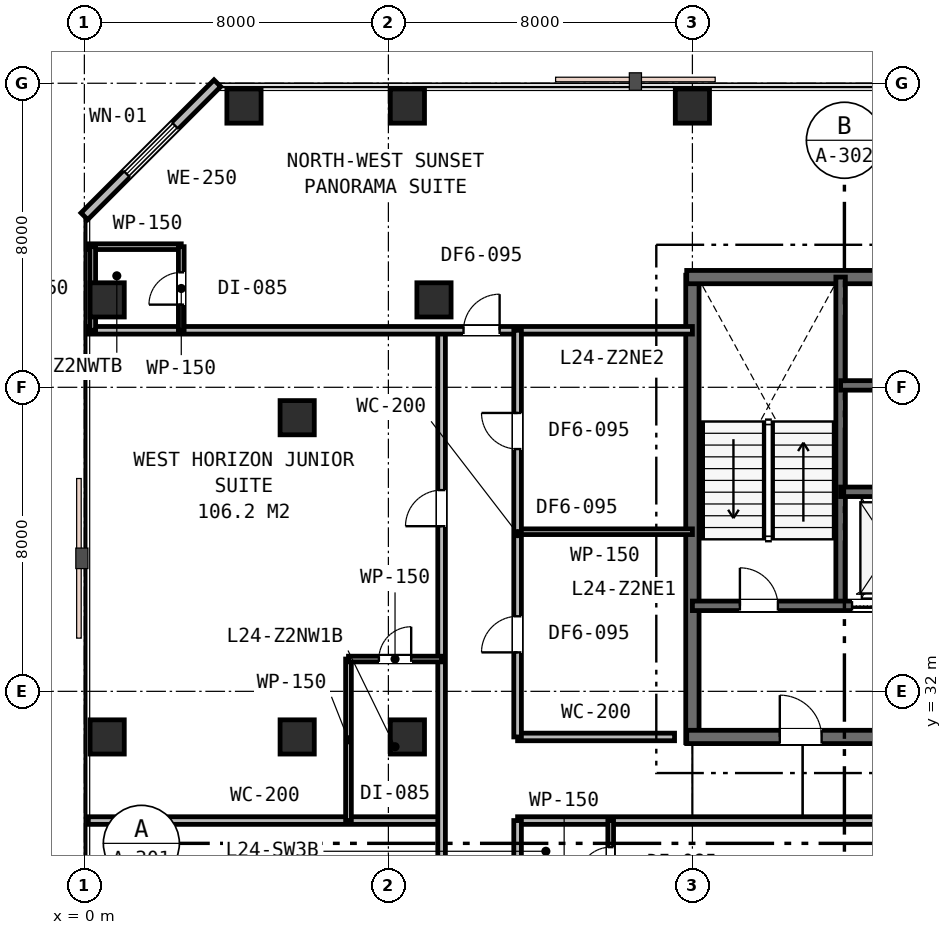
"""IFC4 building model, lengths in metres.
Left out: names, types, materials, properties, quantities, classifications, styles, units other than length and angle.
Written with IfcOpenShell. Run it as: python <this file> out.ifc"""

import sys

from ifc_helpers import new_model, si_unit, direction, frame, frame_2d, origin, origin_2d, place, context, subcontext, project, spatial, rectangle, extrude, element, fill, save


model = new_model("IFC4")
c1 = context("Model", 3, precision=1e-05, world=origin(), true_north=direction((0.0, 1.0)))
c2 = subcontext(c1, "Body", "Model", "MODEL_VIEW")
j1 = project(units=[si_unit("LENGTHUNIT", "METRE"), si_unit("PLANEANGLEUNIT", "RADIAN")], contexts=[c1])
p1 = place(None, origin())
s1 = spatial("IfcSite", under=j1, at=p1, CompositionType="ELEMENT")
p2 = place(p1, origin())
s2 = spatial("IfcBuilding", under=s1, at=p2, CompositionType="ELEMENT")
p3 = place(p2, frame((0.0, 0.0, 97.2)))
s3 = spatial("IfcBuildingStorey", under=s2, at=p3, CompositionType="ELEMENT", Elevation=97.2)
p4 = place(p3, frame((16.0, 30.65, 0.0), z_axis=(0.0, 0.0, 1.0), x_axis=(0.0, 1.0, 0.0)))
e1 = element("IfcWall", 1, at=p4, inside=s3, PredefinedType="SHEAR", context=c2, shape_type="SweptSolid", body=[
    extrude(rectangle(XDim=12.3, YDim=0.35, at=frame_2d((6.15, 0.0))), origin(), (0.0, 0.0, 1.0), 3.6),
])
p5 = place(p3, frame((15.85, 42.9, 0.0), z_axis=(0.0, 0.0, 1.0), x_axis=(1.0, 0.0, 0.0)))
e2 = element("IfcWall", 2, at=p5, inside=s3, PredefinedType="SHEAR", context=c2, shape_type="SweptSolid", body=[
    extrude(rectangle(XDim=24.3, YDim=0.35, at=frame_2d((12.15, 0.0))), origin(), (0.0, 0.0, 1.0), 3.6),
])
p6 = place(p3, frame((15.85, 30.8, 0.0), z_axis=(0.0, 0.0, 1.0), x_axis=(1.0, 0.0, 0.0)))
e3 = element("IfcWall", 3, at=p6, inside=s3, PredefinedType="SHEAR", context=c2, shape_type="SweptSolid", body=[
    extrude(rectangle(XDim=11.2, YDim=0.35, at=frame_2d((5.6, 0.0))), origin(), (0.0, 0.0, 1.0), 3.6),
])
p7 = place(p6, frame((2.45, 0.0, 0.0)))
e4 = element("IfcOpeningElement", 4, at=p7, cuts=e3, PredefinedType="OPENING", context=c2, shape_type="SweptSolid", body=[
    extrude(rectangle(XDim=1.1, YDim=2.15, at=frame_2d((0.55, 1.075))), frame((0.0, 0.185, 0.0), z_axis=(0.0, -1.0, 0.0), x_axis=(1.0, 0.0, 0.0)), (0.0, 0.0, 1.0), 0.37),
])
p8 = place(p3, frame((19.9, 34.25, 0.0), z_axis=(0.0, 0.0, 1.0), x_axis=(0.0, 1.0, 0.0)))
e5 = element("IfcWall", 5, at=p8, inside=s3, PredefinedType="SHEAR", context=c2, shape_type="SweptSolid", body=[
    extrude(rectangle(XDim=8.65, YDim=0.25, at=frame_2d((4.325, 0.0))), origin(), (0.0, 0.0, 1.0), 3.6),
])
p9 = place(p3, frame((16.0, 34.25, 0.0), z_axis=(0.0, 0.0, 1.0), x_axis=(1.0, 0.0, 0.0)))
e6 = element("IfcWall", 6, at=p9, inside=s3, PredefinedType="SHEAR", context=c2, shape_type="SweptSolid", body=[
    extrude(rectangle(XDim=6.05, YDim=0.25, at=frame_2d((3.025, 0.0))), origin(), (0.0, 0.0, 1.0), 3.6),
])
p10 = place(p9, frame((1.25, 0.0, 0.0)))
e7 = element("IfcOpeningElement", 7, at=p10, cuts=e6, PredefinedType="OPENING", context=c2, shape_type="SweptSolid", body=[
    extrude(rectangle(XDim=1.0, YDim=2.15, at=frame_2d((0.5, 1.075))), frame((0.0, 0.135, 0.0), z_axis=(0.0, -1.0, 0.0), x_axis=(1.0, 0.0, 0.0)), (0.0, 0.0, 1.0), 0.27),
])
p11 = place(p9, frame((4.2, 0.0, 0.0)))
e8 = element("IfcOpeningElement", 8, at=p11, cuts=e6, PredefinedType="OPENING", context=c2, shape_type="SweptSolid", body=[
    extrude(rectangle(XDim=1.1, YDim=2.15, at=frame_2d((0.55, 1.075))), frame((0.0, 0.135, 0.0), z_axis=(0.0, -1.0, 0.0), x_axis=(1.0, 0.0, 0.0)), (0.0, 0.0, 1.0), 0.27),
])
p12 = place(p3, frame((19.9, 37.25, 0.0), z_axis=(0.0, 0.0, 1.0), x_axis=(1.0, 0.0, 0.0)))
e9 = element("IfcWall", 9, at=p12, inside=s3, PredefinedType="SHEAR", context=c2, shape_type="SweptSolid", body=[
    extrude(rectangle(XDim=16.2, YDim=0.25, at=frame_2d((8.1, 0.0))), origin(), (0.0, 0.0, 1.0), 3.6),
])
p13 = place(p12, frame((12.55, 0.0, 0.0)))
e10 = element("IfcOpeningElement", 10, at=p13, cuts=e9, PredefinedType="OPENING", context=c2, shape_type="SweptSolid", body=[
    extrude(rectangle(XDim=0.9, YDim=2.15, at=frame_2d((0.45, 1.075))), frame((0.0, 0.135, 0.0), z_axis=(0.0, -1.0, 0.0), x_axis=(1.0, 0.0, 0.0)), (0.0, 0.0, 1.0), 0.27),
])
p14 = place(p3, frame((19.9, 40.05, 0.0), z_axis=(0.0, 0.0, 1.0), x_axis=(1.0, 0.0, 0.0)))
e11 = element("IfcWall", 11, at=p14, inside=s3, PredefinedType="SHEAR", context=c2, shape_type="SweptSolid", body=[
    extrude(rectangle(XDim=12.05, YDim=0.25, at=frame_2d((6.025, 0.0))), origin(), (0.0, 0.0, 1.0), 3.6),
])
for number, where, z_axis, x_axis in (
    (12, (5.6, 30.8, 0.0), (0.0, 0.0, 1.0), (1.0, 0.0, 0.0)),
    (13, (5.6, 39.2, 0.0), (0.0, 0.0, 1.0), (1.0, 0.0, 0.0)),
    (14, (8.5, 30.8, 0.0), (0.0, 0.0, 1.0), (1.0, 0.0, 0.0)),
    (15, (9.2, 42.3, 0.0), (0.0, 0.0, 1.0), (1.0, 0.0, 0.0)),
    (16, (0.6, 30.8, 0.0), (0.0, 0.0, 1.0), (1.0, 0.0, 0.0)),
    (17, (0.6, 42.3, 0.0), (0.0, 0.0, 1.0), (1.0, 0.0, 0.0)),
    (18, (4.2, 47.4, 0.0), (0.0, 0.0, 1.0), (1.0, 0.0, 0.0)),
    (19, (8.5, 47.4, 0.0), (0.0, 0.0, 1.0), (1.0, 0.0, 0.0)),
    (20, (16.0, 47.4, 0.0), (0.0, 0.0, 1.0), (1.0, 0.0, 0.0)),
):
    element("IfcColumn", number, at=place(p3, frame(where, z_axis=z_axis, x_axis=x_axis)), inside=s3, PredefinedType="COLUMN", context=c2, shape_type="SweptSolid", body=[
        extrude(rectangle(XDim=0.9, YDim=0.9, at=origin_2d()), origin(), (0.0, 0.0, 1.0), 3.6),
    ])
p15 = place(p3, frame((3.5, 48.0, 0.0), z_axis=(0.0, 0.0, 1.0), x_axis=(-0.707106781187, -0.707106781187, 0.0)))
e21 = element("IfcWall", 21, at=p15, inside=s3, PredefinedType="STANDARD", context=c2, shape_type="SweptSolid", body=[
    extrude(rectangle(XDim=4.95, YDim=0.25, at=frame_2d((2.475, 0.0))), origin(), (0.0, 0.0, 1.0), 3.33),
])
p16 = place(p15, frame((1.575, 0.0, 0.75)))
e22 = element("IfcOpeningElement", 22, at=p16, cuts=e21, PredefinedType="OPENING", context=c2, shape_type="SweptSolid", body=[
    extrude(rectangle(XDim=1.8, YDim=1.85, at=frame_2d((0.9, 0.925))), frame((0.0, 0.135, 0.0), z_axis=(0.0, -1.0, 0.0), x_axis=(1.0, 0.0, 0.0)), (0.0, 0.0, 1.0), 0.27),
])
p17 = place(p3, frame((0.1, 28.6, 0.0), z_axis=(0.0, 0.0, 1.0), x_axis=(1.0, 0.0, 0.0)))
e23 = element("IfcWall", 23, at=p17, inside=s3, PredefinedType="PARTITIONING", context=c2, shape_type="SweptSolid", body=[
    extrude(rectangle(XDim=9.3, YDim=0.2, at=frame_2d((4.65, 0.0))), origin(), (0.0, 0.0, 1.0), 2.83),
])
p18 = place(p3, frame((11.4, 28.6, 0.0), z_axis=(0.0, 0.0, 1.0), x_axis=(1.0, 0.0, 0.0)))
e24 = element("IfcWall", 24, at=p18, inside=s3, PredefinedType="PARTITIONING", context=c2, shape_type="SweptSolid", body=[
    extrude(rectangle(XDim=32.8, YDim=0.2, at=frame_2d((16.4, 0.0))), origin(), (0.0, 0.0, 1.0), 2.83),
])
p19 = place(p18, frame((14.7, 0.0, 0.0)))
e25 = element("IfcOpeningElement", 25, at=p19, cuts=e24, PredefinedType="OPENING", context=c2, shape_type="SweptSolid", body=[
    extrude(rectangle(XDim=0.95, YDim=2.15, at=frame_2d((0.475, 1.075))), frame((0.0, 0.11, 0.0), z_axis=(0.0, -1.0, 0.0), x_axis=(1.0, 0.0, 0.0)), (0.0, 0.0, 1.0), 0.22),
])
p20 = place(p18, frame((22.475, 0.0, 0.0)))
e26 = element("IfcOpeningElement", 26, at=p20, cuts=e24, PredefinedType="OPENING", context=c2, shape_type="SweptSolid", body=[
    extrude(rectangle(XDim=0.95, YDim=2.15, at=frame_2d((0.475, 1.075))), frame((0.0, 0.11, 0.0), z_axis=(0.0, -1.0, 0.0), x_axis=(1.0, 0.0, 0.0)), (0.0, 0.0, 1.0), 0.22),
])
p21 = place(p18, frame((28.985, 0.0, 0.0)))
e27 = element("IfcOpeningElement", 27, at=p21, cuts=e24, PredefinedType="OPENING", context=c2, shape_type="SweptSolid", body=[
    extrude(rectangle(XDim=0.95, YDim=2.15, at=frame_2d((0.475, 1.075))), frame((0.0, 0.11, 0.0), z_axis=(0.0, -1.0, 0.0), x_axis=(1.0, 0.0, 0.0)), (0.0, 0.0, 1.0), 0.22),
])
p22 = place(p3, frame((11.4, 30.8, 0.0), z_axis=(0.0, 0.0, 1.0), x_axis=(1.0, 0.0, 0.0)))
e28 = element("IfcWall", 28, at=p22, inside=s3, PredefinedType="PARTITIONING", context=c2, shape_type="SweptSolid", body=[
    extrude(rectangle(XDim=4.13, YDim=0.2, at=frame_2d((2.065, 0.0))), origin(), (0.0, 0.0, 1.0), 2.83),
])
p23 = place(p3, frame((9.4, 10.6, 0.0), z_axis=(0.0, 0.0, 1.0), x_axis=(0.0, 1.0, 0.0)))
e29 = element("IfcWall", 29, at=p23, inside=s3, PredefinedType="PARTITIONING", context=c2, shape_type="SweptSolid", body=[
    extrude(rectangle(XDim=30.9, YDim=0.2, at=frame_2d((15.45, 0.0))), origin(), (0.0, 0.0, 1.0), 2.83),
])
p24 = place(p23, frame((8.679, 0.0, 0.0)))
e30 = element("IfcOpeningElement", 30, at=p24, cuts=e29, PredefinedType="OPENING", context=c2, shape_type="SweptSolid", body=[
    extrude(rectangle(XDim=0.95, YDim=2.15, at=frame_2d((0.475, 1.075))), frame((0.0, 0.11, 0.0), z_axis=(0.0, -1.0, 0.0), x_axis=(1.0, 0.0, 0.0)), (0.0, 0.0, 1.0), 0.22),
])
p25 = place(p23, frame((14.68, 0.0, 0.0)))
e31 = element("IfcOpeningElement", 31, at=p25, cuts=e29, PredefinedType="OPENING", context=c2, shape_type="SweptSolid", body=[
    extrude(rectangle(XDim=0.95, YDim=2.15, at=frame_2d((0.475, 1.075))), frame((0.0, 0.11, 0.0), z_axis=(0.0, -1.0, 0.0), x_axis=(1.0, 0.0, 0.0)), (0.0, 0.0, 1.0), 0.22),
])
p26 = place(p23, frame((4.273, 0.0, 0.0)))
e32 = element("IfcOpeningElement", 32, at=p26, cuts=e29, PredefinedType="OPENING", context=c2, shape_type="SweptSolid", body=[
    extrude(rectangle(XDim=0.95, YDim=2.15, at=frame_2d((0.475, 1.075))), frame((0.0, 0.11, 0.0), z_axis=(0.0, -1.0, 0.0), x_axis=(1.0, 0.0, 0.0)), (0.0, 0.0, 1.0), 0.22),
])
p27 = place(p23, frame((25.745, 0.0, 0.0)))
e33 = element("IfcOpeningElement", 33, at=p27, cuts=e29, PredefinedType="OPENING", context=c2, shape_type="SweptSolid", body=[
    extrude(rectangle(XDim=0.95, YDim=2.15, at=frame_2d((0.475, 1.075))), frame((0.0, 0.11, 0.0), z_axis=(0.0, -1.0, 0.0), x_axis=(1.0, 0.0, 0.0)), (0.0, 0.0, 1.0), 0.22),
])
p28 = place(p3, frame((0.1, 41.5, 0.0), z_axis=(0.0, 0.0, 1.0), x_axis=(1.0, 0.0, 0.0)))
e34 = element("IfcWall", 34, at=p28, inside=s3, PredefinedType="PARTITIONING", context=c2, shape_type="SweptSolid", body=[
    extrude(rectangle(XDim=15.9, YDim=0.2, at=frame_2d((7.95, 0.0))), origin(), (0.0, 0.0, 1.0), 2.83),
])
p29 = place(p28, frame((9.877, 0.0, 0.0)))
e35 = element("IfcOpeningElement", 35, at=p29, cuts=e34, PredefinedType="OPENING", context=c2, shape_type="SweptSolid", body=[
    extrude(rectangle(XDim=0.95, YDim=2.15, at=frame_2d((0.475, 1.075))), frame((0.0, 0.11, 0.0), z_axis=(0.0, -1.0, 0.0), x_axis=(1.0, 0.0, 0.0)), (0.0, 0.0, 1.0), 0.22),
])
p30 = place(p3, frame((0.1, 43.7, 0.0), z_axis=(0.0, 0.0, 1.0), x_axis=(1.0, 0.0, 0.0)))
e36 = element("IfcWall", 36, at=p30, inside=s3, PredefinedType="PARTITIONING", context=c2, shape_type="SweptSolid", body=[
    extrude(rectangle(XDim=2.45, YDim=0.15, at=frame_2d((1.225, 0.0))), origin(), (0.0, 0.0, 1.0), 3.33),
])
p31 = place(p3, frame((2.55, 41.5, 0.0), z_axis=(0.0, 0.0, 1.0), x_axis=(0.0, 1.0, 0.0)))
e37 = element("IfcWall", 37, at=p31, inside=s3, PredefinedType="PARTITIONING", context=c2, shape_type="SweptSolid", body=[
    extrude(rectangle(XDim=2.2, YDim=0.15, at=frame_2d((1.1, 0.0))), origin(), (0.0, 0.0, 1.0), 2.83),
])
p32 = place(p31, frame((0.675, 0.0, 0.0)))
e38 = element("IfcOpeningElement", 38, at=p32, cuts=e37, PredefinedType="OPENING", context=c2, shape_type="SweptSolid", body=[
    extrude(rectangle(XDim=0.85, YDim=2.15, at=frame_2d((0.425, 1.075))), frame((0.0, 0.085, 0.0), z_axis=(0.0, -1.0, 0.0), x_axis=(1.0, 0.0, 0.0)), (0.0, 0.0, 1.0), 0.17),
])
p33 = place(p3, frame((0.22, 41.5, 0.0), z_axis=(0.0, 0.0, 1.0), x_axis=(0.0, 1.0, 0.0)))
e39 = element("IfcWall", 39, at=p33, inside=s3, PredefinedType="PARTITIONING", context=c2, shape_type="SweptSolid", body=[
    extrude(rectangle(XDim=2.2, YDim=0.15, at=frame_2d((1.1, 0.0))), origin(), (0.0, 0.0, 1.0), 2.83),
])
p34 = place(p3, frame((6.95, 28.6, 0.0), z_axis=(0.0, 0.0, 1.0), x_axis=(0.0, 1.0, 0.0)))
e40 = element("IfcWall", 40, at=p34, inside=s3, PredefinedType="PARTITIONING", context=c2, shape_type="SweptSolid", body=[
    extrude(rectangle(XDim=4.25, YDim=0.15, at=frame_2d((2.125, 0.0))), origin(), (0.0, 0.0, 1.0), 2.83),
])
p35 = place(p3, frame((6.95, 32.85, 0.0), z_axis=(0.0, 0.0, 1.0), x_axis=(1.0, 0.0, 0.0)))
e41 = element("IfcWall", 41, at=p35, inside=s3, PredefinedType="PARTITIONING", context=c2, shape_type="SweptSolid", body=[
    extrude(rectangle(XDim=2.45, YDim=0.15, at=frame_2d((1.225, 0.0))), origin(), (0.0, 0.0, 1.0), 2.83),
])
p36 = place(p35, frame((0.8, 0.0, 0.0)))
e42 = element("IfcOpeningElement", 42, at=p36, cuts=e41, PredefinedType="OPENING", context=c2, shape_type="SweptSolid", body=[
    extrude(rectangle(XDim=0.85, YDim=2.15, at=frame_2d((0.425, 1.075))), frame((0.0, 0.085, 0.0), z_axis=(0.0, -1.0, 0.0), x_axis=(1.0, 0.0, 0.0)), (0.0, 0.0, 1.0), 0.17),
])
p37 = place(p3, frame((11.4, 36.2, 0.0), z_axis=(0.0, 0.0, 1.0), x_axis=(1.0, 0.0, 0.0)))
e43 = element("IfcWall", 43, at=p37, inside=s3, PredefinedType="PARTITIONING", context=c2, shape_type="SweptSolid", body=[
    extrude(rectangle(XDim=4.6, YDim=0.15, at=frame_2d((2.3, 0.0))), origin(), (0.0, 0.0, 1.0), 3.33),
])
p38 = place(p3, frame((11.4, 30.8, 0.0), z_axis=(0.0, 0.0, 1.0), x_axis=(0.0, 1.0, 0.0)))
e44 = element("IfcWall", 44, at=p38, inside=s3, PredefinedType="PARTITIONING", context=c2, shape_type="SweptSolid", body=[
    extrude(rectangle(XDim=10.7, YDim=0.2, at=frame_2d((5.35, 0.0))), origin(), (0.0, 0.0, 1.0), 2.83),
])
p39 = place(p38, frame((2.225, 0.0, 0.0)))
e45 = element("IfcOpeningElement", 45, at=p39, cuts=e44, PredefinedType="OPENING", context=c2, shape_type="SweptSolid", body=[
    extrude(rectangle(XDim=0.95, YDim=2.15, at=frame_2d((0.475, 1.075))), frame((0.0, 0.11, 0.0), z_axis=(0.0, -1.0, 0.0), x_axis=(1.0, 0.0, 0.0)), (0.0, 0.0, 1.0), 0.22),
])
p40 = place(p38, frame((7.575, 0.0, 0.0)))
e46 = element("IfcOpeningElement", 46, at=p40, cuts=e44, PredefinedType="OPENING", context=c2, shape_type="SweptSolid", body=[
    extrude(rectangle(XDim=0.95, YDim=2.15, at=frame_2d((0.475, 1.075))), frame((0.0, 0.11, 0.0), z_axis=(0.0, -1.0, 0.0), x_axis=(1.0, 0.0, 0.0)), (0.0, 0.0, 1.0), 0.22),
])
p41 = place(p3, frame((11.4, 10.6, 0.0), z_axis=(0.0, 0.0, 1.0), x_axis=(0.0, 1.0, 0.0)))
e47 = element("IfcWall", 47, at=p41, inside=s3, PredefinedType="PARTITIONING", context=c2, shape_type="SweptSolid", body=[
    extrude(rectangle(XDim=18.0, YDim=0.2, at=frame_2d((9.0, 0.0))), origin(), (0.0, 0.0, 1.0), 2.83),
])
p42 = place(p41, frame((1.29, 0.0, 0.0)))
e48 = element("IfcOpeningElement", 48, at=p42, cuts=e47, PredefinedType="OPENING", context=c2, shape_type="SweptSolid", body=[
    extrude(rectangle(XDim=0.95, YDim=2.15, at=frame_2d((0.475, 1.075))), frame((0.0, 0.11, 0.0), z_axis=(0.0, -1.0, 0.0), x_axis=(1.0, 0.0, 0.0)), (0.0, 0.0, 1.0), 0.22),
])
p43 = place(p41, frame((7.29, 0.0, 0.0)))
e49 = element("IfcOpeningElement", 49, at=p43, cuts=e47, PredefinedType="OPENING", context=c2, shape_type="SweptSolid", body=[
    extrude(rectangle(XDim=0.95, YDim=2.15, at=frame_2d((0.475, 1.075))), frame((0.0, 0.11, 0.0), z_axis=(0.0, -1.0, 0.0), x_axis=(1.0, 0.0, 0.0)), (0.0, 0.0, 1.0), 0.22),
])
p44 = place(p41, frame((13.29, 0.0, 0.0)))
e50 = element("IfcOpeningElement", 50, at=p44, cuts=e47, PredefinedType="OPENING", context=c2, shape_type="SweptSolid", body=[
    extrude(rectangle(XDim=0.95, YDim=2.15, at=frame_2d((0.475, 1.075))), frame((0.0, 0.11, 0.0), z_axis=(0.0, -1.0, 0.0), x_axis=(1.0, 0.0, 0.0)), (0.0, 0.0, 1.0), 0.22),
])
p45 = place(p3, frame((13.85, 26.35, 0.0), z_axis=(0.0, 0.0, 1.0), x_axis=(0.0, 1.0, 0.0)))
e51 = element("IfcWall", 51, at=p45, inside=s3, PredefinedType="PARTITIONING", context=c2, shape_type="SweptSolid", body=[
    extrude(rectangle(XDim=2.25, YDim=0.15, at=frame_2d((1.125, 0.0))), origin(), (0.0, 0.0, 1.0), 3.33),
])
p46 = place(p45, frame((0.7, 0.0, 0.0)))
e52 = element("IfcOpeningElement", 52, at=p46, cuts=e51, PredefinedType="OPENING", context=c2, shape_type="SweptSolid", body=[
    extrude(rectangle(XDim=0.85, YDim=2.15, at=frame_2d((0.425, 1.075))), frame((0.0, 0.085, 0.0), z_axis=(0.0, -1.0, 0.0), x_axis=(1.0, 0.0, 0.0)), (0.0, 0.0, 1.0), 0.17),
])
p47 = place(p16, origin())
e53 = element("IfcWindow", 53, at=p47, inside=s3, PartitioningType="SINGLE_PANEL", PredefinedType="WINDOW", context=c2, shape_type="SweptSolid", body=[
    extrude(rectangle(XDim=1.8, YDim=1.85, at=frame_2d((0.9, 0.925))), frame((0.0, 0.03, 0.0), z_axis=(0.0, -1.0, 0.0), x_axis=(1.0, 0.0, 0.0)), (0.0, 0.0, 1.0), 0.06),
])
fill(e22, e53)
p48 = place(p10, origin())
e54 = element("IfcDoor", 54, at=p48, inside=s3, OperationType="SINGLE_SWING_LEFT", PredefinedType="DOOR", context=c2, shape_type="SweptSolid", body=[
    extrude(rectangle(XDim=1.0, YDim=2.15, at=frame_2d((0.5, 1.075))), frame((0.0, 0.025, 0.0), z_axis=(0.0, -1.0, 0.0), x_axis=(1.0, 0.0, 0.0)), (0.0, 0.0, 1.0), 0.05),
])
fill(e7, e54)
p49 = place(p7, origin())
e55 = element("IfcDoor", 55, at=p49, inside=s3, OperationType="SINGLE_SWING_LEFT", PredefinedType="DOOR", context=c2, shape_type="SweptSolid", body=[
    extrude(rectangle(XDim=1.1, YDim=2.15, at=frame_2d((0.55, 1.075))), frame((0.0, 0.025, 0.0), z_axis=(0.0, -1.0, 0.0), x_axis=(1.0, 0.0, 0.0)), (0.0, 0.0, 1.0), 0.05),
])
fill(e4, e55)
p50 = place(p29, origin())
e56 = element("IfcDoor", 56, at=p50, inside=s3, OperationType="SINGLE_SWING_RIGHT", PredefinedType="DOOR", context=c2, shape_type="SweptSolid", body=[
    extrude(rectangle(XDim=0.95, YDim=2.15, at=frame_2d((0.475, 1.075))), frame((0.0, 0.025, 0.0), z_axis=(0.0, -1.0, 0.0), x_axis=(1.0, 0.0, 0.0)), (0.0, 0.0, 1.0), 0.05),
])
fill(e35, e56)
p51 = place(p32, origin())
e57 = element("IfcDoor", 57, at=p51, inside=s3, OperationType="SINGLE_SWING_LEFT", PredefinedType="DOOR", context=c2, shape_type="SweptSolid", body=[
    extrude(rectangle(XDim=0.85, YDim=2.15, at=frame_2d((0.425, 1.075))), frame((0.0, 0.025, 0.0), z_axis=(0.0, -1.0, 0.0), x_axis=(1.0, 0.0, 0.0)), (0.0, 0.0, 1.0), 0.05),
])
fill(e38, e57)
p52 = place(p27, origin())
e58 = element("IfcDoor", 58, at=p52, inside=s3, OperationType="SINGLE_SWING_LEFT", PredefinedType="DOOR", context=c2, shape_type="SweptSolid", body=[
    extrude(rectangle(XDim=0.95, YDim=2.15, at=frame_2d((0.475, 1.075))), frame((0.0, 0.025, 0.0), z_axis=(0.0, -1.0, 0.0), x_axis=(1.0, 0.0, 0.0)), (0.0, 0.0, 1.0), 0.05),
])
fill(e33, e58)
p53 = place(p36, origin())
e59 = element("IfcDoor", 59, at=p53, inside=s3, OperationType="SINGLE_SWING_RIGHT", PredefinedType="DOOR", context=c2, shape_type="SweptSolid", body=[
    extrude(rectangle(XDim=0.85, YDim=2.15, at=frame_2d((0.425, 1.075))), frame((0.0, 0.025, 0.0), z_axis=(0.0, -1.0, 0.0), x_axis=(1.0, 0.0, 0.0)), (0.0, 0.0, 1.0), 0.05),
])
fill(e42, e59)
p54 = place(p39, origin())
e60 = element("IfcDoor", 60, at=p54, inside=s3, OperationType="SINGLE_SWING_LEFT", PredefinedType="DOOR", context=c2, shape_type="SweptSolid", body=[
    extrude(rectangle(XDim=0.95, YDim=2.15, at=frame_2d((0.475, 1.075))), frame((0.0, 0.025, 0.0), z_axis=(0.0, -1.0, 0.0), x_axis=(1.0, 0.0, 0.0)), (0.0, 0.0, 1.0), 0.05),
])
fill(e45, e60)
p55 = place(p40, origin())
e61 = element("IfcDoor", 61, at=p55, inside=s3, OperationType="SINGLE_SWING_RIGHT", PredefinedType="DOOR", context=c2, shape_type="SweptSolid", body=[
    extrude(rectangle(XDim=0.95, YDim=2.15, at=frame_2d((0.475, 1.075))), frame((0.0, 0.025, 0.0), z_axis=(0.0, -1.0, 0.0), x_axis=(1.0, 0.0, 0.0)), (0.0, 0.0, 1.0), 0.05),
])
fill(e46, e61)
p56 = place(p46, origin())
e62 = element("IfcDoor", 62, at=p56, inside=s3, OperationType="SINGLE_SWING_LEFT", PredefinedType="DOOR", context=c2, shape_type="SweptSolid", body=[
    extrude(rectangle(XDim=0.85, YDim=2.15, at=frame_2d((0.425, 1.075))), frame((0.0, 0.025, 0.0), z_axis=(0.0, -1.0, 0.0), x_axis=(1.0, 0.0, 0.0)), (0.0, 0.0, 1.0), 0.05),
])
fill(e52, e62)
p57 = place(p11, origin())
e63 = element("IfcDoor", 63, at=p57, inside=s3, OperationType="DOUBLE_DOOR_SLIDING", PredefinedType="DOOR", context=c2, shape_type="SweptSolid", body=[
    extrude(rectangle(XDim=1.1, YDim=2.15, at=frame_2d((0.55, 1.075))), frame((0.0, 0.025, 0.0), z_axis=(0.0, -1.0, 0.0), x_axis=(1.0, 0.0, 0.0)), (0.0, 0.0, 1.0), 0.05),
])
fill(e8, e63)
save(model, sys.argv[1])
